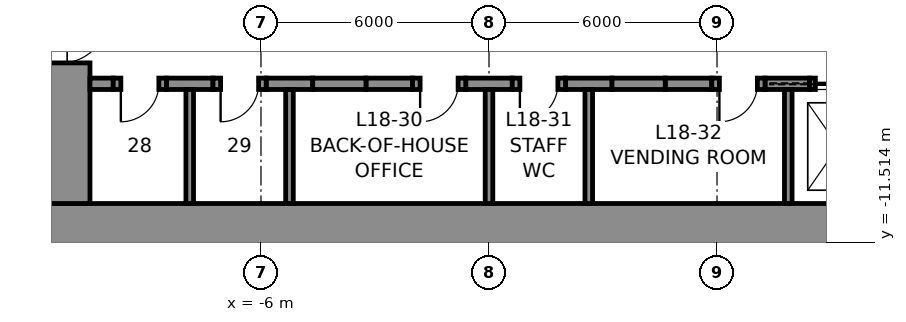
"""IFC4 building model, lengths in metres.
Left out: names, types, materials, properties, quantities, classifications, styles, units other than length and angle.
Written with IfcOpenShell. Run it as: python <this file> out.ifc"""

import sys

from ifc_helpers import new_model, si_unit, direction, frame, frame_2d, origin, place, context, subcontext, project, spatial, rectangle, extrude, element, fill, save


model = new_model("IFC4")
c1 = context("Model", 3, precision=1e-05, world=origin(), true_north=direction((0.0, 1.0)))
c2 = subcontext(c1, "Body", "Model", "MODEL_VIEW")
j1 = project(units=[si_unit("LENGTHUNIT", "METRE"), si_unit("PLANEANGLEUNIT", "RADIAN")], contexts=[c1])
p1 = place(None, origin())
s1 = spatial("IfcSite", under=j1, at=p1, CompositionType="ELEMENT")
p2 = place(p1, origin())
s2 = spatial("IfcBuilding", under=s1, at=p2, CompositionType="ELEMENT")
p3 = place(p2, frame((0.0, 0.0, 95.2)))
s3 = spatial("IfcBuildingStorey", under=s2, at=p3, CompositionType="ELEMENT", Elevation=95.2)
p4 = place(p3, frame((12.0, -11.25, 0.0), z_axis=(0.0, 0.0, 1.0), x_axis=(-1.0, 0.0, 0.0)))
e1 = element("IfcWall", 1, at=p4, inside=s3, PredefinedType="SHEAR", context=c2, shape_type="SweptSolid", body=[
    extrude(rectangle(XDim=24.0, YDim=1.5, at=frame_2d((12.0, 0.0))), origin(), (0.0, 0.0, 1.0), 4.6),
])
p5 = place(p3, frame((-11.25, -10.5, 0.0), z_axis=(0.0, 0.0, 1.0), x_axis=(0.0, 1.0, 0.0)))
e2 = element("IfcWall", 2, at=p5, inside=s3, PredefinedType="SHEAR", context=c2, shape_type="SweptSolid", body=[
    extrude(rectangle(XDim=21.0, YDim=1.5, at=frame_2d((10.5, 0.0))), origin(), (0.0, 0.0, 1.0), 4.6),
])
p6 = place(p5, frame((16.1, 0.0, 0.0)))
e3 = element("IfcOpeningElement", 3, at=p6, cuts=e2, PredefinedType="OPENING", context=c2, shape_type="SweptSolid", body=[
    extrude(rectangle(XDim=1.2, YDim=2.3, at=frame_2d((0.6, 1.15))), frame((0.0, 0.76, 0.0), z_axis=(0.0, -1.0, 0.0), x_axis=(1.0, 0.0, 0.0)), (0.0, 0.0, 1.0), 1.52),
])
p7 = place(p5, frame((3.7, 0.0, 0.0)))
e4 = element("IfcOpeningElement", 4, at=p7, cuts=e2, PredefinedType="OPENING", context=c2, shape_type="SweptSolid", body=[
    extrude(rectangle(XDim=1.2, YDim=2.3, at=frame_2d((0.6, 1.15))), frame((0.0, 0.76, 0.0), z_axis=(0.0, -1.0, 0.0), x_axis=(1.0, 0.0, 0.0)), (0.0, 0.0, 1.0), 1.52),
])
p8 = place(p3, frame((-10.5, -7.35, 0.0), z_axis=(0.0, 0.0, 1.0), x_axis=(1.0, 0.0, 0.0)))
e5 = element("IfcWall", 5, at=p8, inside=s3, PredefinedType="SHEAR", context=c2, shape_type="SweptSolid", body=[
    extrude(rectangle(XDim=0.613, YDim=0.3, at=frame_2d((0.306, 0.0))), origin(), (0.0, 0.0, 1.0), 4.6),
])
for number, where, z_axis, x_axis in (
    (6, (-8.488, -7.35, 0.0), (0.0, 0.0, 1.0), (1.0, 0.0, 0.0)),
    (7, (-5.863, -7.35, 0.0), (0.0, 0.0, 1.0), (1.0, 0.0, 0.0)),
    (8, (-3.238, -7.35, 0.0), (0.0, 0.0, 1.0), (1.0, 0.0, 0.0)),
    (9, (-0.613, -7.35, 0.0), (0.0, 0.0, 1.0), (1.0, 0.0, 0.0)),
    (10, (2.012, -7.35, 0.0), (0.0, 0.0, 1.0), (1.0, 0.0, 0.0)),
    (11, (4.637, -7.35, 0.0), (0.0, 0.0, 1.0), (1.0, 0.0, 0.0)),
):
    element("IfcWall", number, at=place(p3, frame(where, z_axis=z_axis, x_axis=x_axis)), inside=s3, PredefinedType="SHEAR", context=c2, shape_type="SweptSolid", body=[
        extrude(rectangle(XDim=1.225, YDim=0.3, at=frame_2d((0.613, 0.0))), origin(), (0.0, 0.0, 1.0), 4.6),
    ])
p9 = place(p3, frame((7.262, -7.35, 0.0), z_axis=(0.0, 0.0, 1.0), x_axis=(1.0, 0.0, 0.0)))
e12 = element("IfcWall", 12, at=p9, inside=s3, PredefinedType="SHEAR", context=c2, shape_type="SweptSolid", body=[
    extrude(rectangle(XDim=1.175, YDim=0.3, at=frame_2d((0.587, 0.0))), origin(), (0.0, 0.0, 1.0), 4.6),
])
p10 = place(p3, frame((-9.887, -7.35, 0.0), z_axis=(0.0, 0.0, 1.0), x_axis=(1.0, 0.0, 0.0)))
e13 = element("IfcWall", 13, at=p10, inside=s3, PredefinedType="PARTITIONING", context=c2, shape_type="SweptSolid", body=[
    extrude(rectangle(XDim=1.4, YDim=0.3, at=frame_2d((0.7, 0.0))), origin(), (0.0, 0.0, 1.0), 4.6),
])
p11 = place(p10, frame((0.2, 0.0, 0.0)))
e14 = element("IfcOpeningElement", 14, at=p11, cuts=e13, PredefinedType="OPENING", context=c2, shape_type="SweptSolid", body=[
    extrude(rectangle(XDim=1.0, YDim=2.3, at=frame_2d((0.5, 1.15))), frame((0.0, 0.16, 0.0), z_axis=(0.0, -1.0, 0.0), x_axis=(1.0, 0.0, 0.0)), (0.0, 0.0, 1.0), 0.32),
])
p12 = place(p3, frame((-7.262, -7.35, 0.0), z_axis=(0.0, 0.0, 1.0), x_axis=(1.0, 0.0, 0.0)))
e15 = element("IfcWall", 15, at=p12, inside=s3, PredefinedType="PARTITIONING", context=c2, shape_type="SweptSolid", body=[
    extrude(rectangle(XDim=1.4, YDim=0.3, at=frame_2d((0.7, 0.0))), origin(), (0.0, 0.0, 1.0), 4.6),
])
p13 = place(p12, frame((0.2, 0.0, 0.0)))
e16 = element("IfcOpeningElement", 16, at=p13, cuts=e15, PredefinedType="OPENING", context=c2, shape_type="SweptSolid", body=[
    extrude(rectangle(XDim=1.0, YDim=2.3, at=frame_2d((0.5, 1.15))), frame((0.0, 0.16, 0.0), z_axis=(0.0, -1.0, 0.0), x_axis=(1.0, 0.0, 0.0)), (0.0, 0.0, 1.0), 0.32),
])
p14 = place(p3, frame((-4.637, -7.35, 0.0), z_axis=(0.0, 0.0, 1.0), x_axis=(1.0, 0.0, 0.0)))
e17 = element("IfcWall", 17, at=p14, inside=s3, PredefinedType="PARTITIONING", context=c2, shape_type="SweptSolid", body=[
    extrude(rectangle(XDim=1.4, YDim=0.3, at=frame_2d((0.7, 0.0))), origin(), (0.0, 0.0, 1.0), 4.6),
])
p15 = place(p3, frame((-2.012, -7.35, 0.0), z_axis=(0.0, 0.0, 1.0), x_axis=(1.0, 0.0, 0.0)))
e18 = element("IfcWall", 18, at=p15, inside=s3, PredefinedType="PARTITIONING", context=c2, shape_type="SweptSolid", body=[
    extrude(rectangle(XDim=1.4, YDim=0.3, at=frame_2d((0.7, 0.0))), origin(), (0.0, 0.0, 1.0), 4.6),
])
p16 = place(p15, frame((0.2, 0.0, 0.0)))
e19 = element("IfcOpeningElement", 19, at=p16, cuts=e18, PredefinedType="OPENING", context=c2, shape_type="SweptSolid", body=[
    extrude(rectangle(XDim=1.0, YDim=2.3, at=frame_2d((0.5, 1.15))), frame((0.0, 0.16, 0.0), z_axis=(0.0, -1.0, 0.0), x_axis=(1.0, 0.0, 0.0)), (0.0, 0.0, 1.0), 0.32),
])
p17 = place(p3, frame((0.613, -7.35, 0.0), z_axis=(0.0, 0.0, 1.0), x_axis=(1.0, 0.0, 0.0)))
e20 = element("IfcWall", 20, at=p17, inside=s3, PredefinedType="PARTITIONING", context=c2, shape_type="SweptSolid", body=[
    extrude(rectangle(XDim=1.4, YDim=0.3, at=frame_2d((0.7, 0.0))), origin(), (0.0, 0.0, 1.0), 4.6),
])
p18 = place(p17, frame((0.2, 0.0, 0.0)))
e21 = element("IfcOpeningElement", 21, at=p18, cuts=e20, PredefinedType="OPENING", context=c2, shape_type="SweptSolid", body=[
    extrude(rectangle(XDim=1.0, YDim=2.3, at=frame_2d((0.5, 1.15))), frame((0.0, 0.16, 0.0), z_axis=(0.0, -1.0, 0.0), x_axis=(1.0, 0.0, 0.0)), (0.0, 0.0, 1.0), 0.32),
])
p19 = place(p3, frame((3.238, -7.35, 0.0), z_axis=(0.0, 0.0, 1.0), x_axis=(1.0, 0.0, 0.0)))
e22 = element("IfcWall", 22, at=p19, inside=s3, PredefinedType="PARTITIONING", context=c2, shape_type="SweptSolid", body=[
    extrude(rectangle(XDim=1.4, YDim=0.3, at=frame_2d((0.7, 0.0))), origin(), (0.0, 0.0, 1.0), 4.6),
])
p20 = place(p3, frame((5.863, -7.35, 0.0), z_axis=(0.0, 0.0, 1.0), x_axis=(1.0, 0.0, 0.0)))
e23 = element("IfcWall", 23, at=p20, inside=s3, PredefinedType="PARTITIONING", context=c2, shape_type="SweptSolid", body=[
    extrude(rectangle(XDim=1.4, YDim=0.3, at=frame_2d((0.7, 0.0))), origin(), (0.0, 0.0, 1.0), 4.6),
])
p21 = place(p20, frame((0.2, 0.0, 0.0)))
e24 = element("IfcOpeningElement", 24, at=p21, cuts=e23, PredefinedType="OPENING", context=c2, shape_type="SweptSolid", body=[
    extrude(rectangle(XDim=1.0, YDim=2.3, at=frame_2d((0.5, 1.15))), frame((0.0, 0.16, 0.0), z_axis=(0.0, -1.0, 0.0), x_axis=(1.0, 0.0, 0.0)), (0.0, 0.0, 1.0), 0.32),
])
p22 = place(p3, frame((8.438, -7.35, 0.0), z_axis=(0.0, 0.0, 1.0), x_axis=(1.0, 0.0, 0.0)))
e25 = element("IfcWall", 25, at=p22, inside=s3, PredefinedType="PARTITIONING", context=c2, shape_type="SweptSolid", body=[
    extrude(rectangle(XDim=1.5, YDim=0.3, at=frame_2d((0.75, 0.0))), origin(), (0.0, 0.0, 1.0), 4.6),
])
p23 = place(p22, frame((0.15, 0.0, 0.0)))
e26 = element("IfcOpeningElement", 26, at=p23, cuts=e25, PredefinedType="OPENING", context=c2, shape_type="SweptSolid", body=[
    extrude(rectangle(XDim=1.2, YDim=2.3, at=frame_2d((0.6, 1.15))), frame((0.0, 0.16, 0.0), z_axis=(0.0, -1.0, 0.0), x_axis=(1.0, 0.0, 0.0)), (0.0, 0.0, 1.0), 0.32),
])
for number, where, z_axis, x_axis in (
    (27, (-7.875, -10.5, 0.0), (0.0, 0.0, 1.0), (0.0, 1.0, 0.0)),
    (28, (-5.25, -10.5, 0.0), (0.0, 0.0, 1.0), (0.0, 1.0, 0.0)),
    (29, (0.0, -10.5, 0.0), (0.0, 0.0, 1.0), (0.0, 1.0, 0.0)),
    (30, (2.625, -10.5, 0.0), (0.0, 0.0, 1.0), (0.0, 1.0, 0.0)),
    (31, (7.875, -10.5, 0.0), (0.0, 0.0, 1.0), (0.0, 1.0, 0.0)),
):
    element("IfcWall", number, at=place(p3, frame(where, z_axis=z_axis, x_axis=x_axis)), inside=s3, PredefinedType="PARTITIONING", context=c2, shape_type="SweptSolid", body=[
        extrude(rectangle(XDim=3.0, YDim=0.2, at=frame_2d((1.5, 0.0))), origin(), (0.0, 0.0, 1.0), 4.6),
    ])
p24 = place(p11, frame((1.0, 0.0, 0.0), z_axis=(0.0, 0.0, 1.0), x_axis=(-1.0, 0.0, 0.0)))
e32 = element("IfcDoor", 32, at=p24, inside=s3, OperationType="SINGLE_SWING_RIGHT", PredefinedType="DOOR", context=c2, shape_type="SweptSolid", body=[
    extrude(rectangle(XDim=1.0, YDim=2.3, at=frame_2d((0.5, 1.15))), frame((0.0, 0.025, 0.0), z_axis=(0.0, -1.0, 0.0), x_axis=(1.0, 0.0, 0.0)), (0.0, 0.0, 1.0), 0.05),
])
fill(e14, e32)
p25 = place(p13, frame((1.0, 0.0, 0.0), z_axis=(0.0, 0.0, 1.0), x_axis=(-1.0, 0.0, 0.0)))
e33 = element("IfcDoor", 33, at=p25, inside=s3, OperationType="SINGLE_SWING_RIGHT", PredefinedType="DOOR", context=c2, shape_type="SweptSolid", body=[
    extrude(rectangle(XDim=1.0, YDim=2.3, at=frame_2d((0.5, 1.15))), frame((0.0, 0.025, 0.0), z_axis=(0.0, -1.0, 0.0), x_axis=(1.0, 0.0, 0.0)), (0.0, 0.0, 1.0), 0.05),
])
fill(e16, e33)
p26 = place(p16, frame((1.0, 0.0, 0.0), z_axis=(0.0, 0.0, 1.0), x_axis=(-1.0, 0.0, 0.0)))
e34 = element("IfcDoor", 34, at=p26, inside=s3, OperationType="SINGLE_SWING_RIGHT", PredefinedType="DOOR", context=c2, shape_type="SweptSolid", body=[
    extrude(rectangle(XDim=1.0, YDim=2.3, at=frame_2d((0.5, 1.15))), frame((0.0, 0.025, 0.0), z_axis=(0.0, -1.0, 0.0), x_axis=(1.0, 0.0, 0.0)), (0.0, 0.0, 1.0), 0.05),
])
fill(e19, e34)
p27 = place(p18, frame((1.0, 0.0, 0.0), z_axis=(0.0, 0.0, 1.0), x_axis=(-1.0, 0.0, 0.0)))
e35 = element("IfcDoor", 35, at=p27, inside=s3, OperationType="SINGLE_SWING_RIGHT", PredefinedType="DOOR", context=c2, shape_type="SweptSolid", body=[
    extrude(rectangle(XDim=1.0, YDim=2.3, at=frame_2d((0.5, 1.15))), frame((0.0, 0.025, 0.0), z_axis=(0.0, -1.0, 0.0), x_axis=(1.0, 0.0, 0.0)), (0.0, 0.0, 1.0), 0.05),
])
fill(e21, e35)
p28 = place(p21, frame((1.0, 0.0, 0.0), z_axis=(0.0, 0.0, 1.0), x_axis=(-1.0, 0.0, 0.0)))
e36 = element("IfcDoor", 36, at=p28, inside=s3, OperationType="SINGLE_SWING_RIGHT", PredefinedType="DOOR", context=c2, shape_type="SweptSolid", body=[
    extrude(rectangle(XDim=1.0, YDim=2.3, at=frame_2d((0.5, 1.15))), frame((0.0, 0.025, 0.0), z_axis=(0.0, -1.0, 0.0), x_axis=(1.0, 0.0, 0.0)), (0.0, 0.0, 1.0), 0.05),
])
fill(e24, e36)
p29 = place(p7, frame((1.2, 0.0, 0.0), z_axis=(0.0, 0.0, 1.0), x_axis=(-1.0, 0.0, 0.0)))
e37 = element("IfcDoor", 37, at=p29, inside=s3, OperationType="SINGLE_SWING_LEFT", PredefinedType="DOOR", context=c2, shape_type="SweptSolid", body=[
    extrude(rectangle(XDim=1.2, YDim=2.3, at=frame_2d((0.6, 1.15))), frame((0.0, 0.025, 0.0), z_axis=(0.0, -1.0, 0.0), x_axis=(1.0, 0.0, 0.0)), (0.0, 0.0, 1.0), 0.05),
])
fill(e4, e37)
p30 = place(p23, origin())
e38 = element("IfcDoor", 38, at=p30, inside=s3, OperationType="SLIDING_TO_LEFT", PredefinedType="DOOR", context=c2, shape_type="SweptSolid", body=[
    extrude(rectangle(XDim=1.2, YDim=2.3, at=frame_2d((0.6, 1.15))), frame((0.0, 0.025, 0.0), z_axis=(0.0, -1.0, 0.0), x_axis=(1.0, 0.0, 0.0)), (0.0, 0.0, 1.0), 0.05),
])
fill(e26, e38)
save(model, sys.argv[1])
